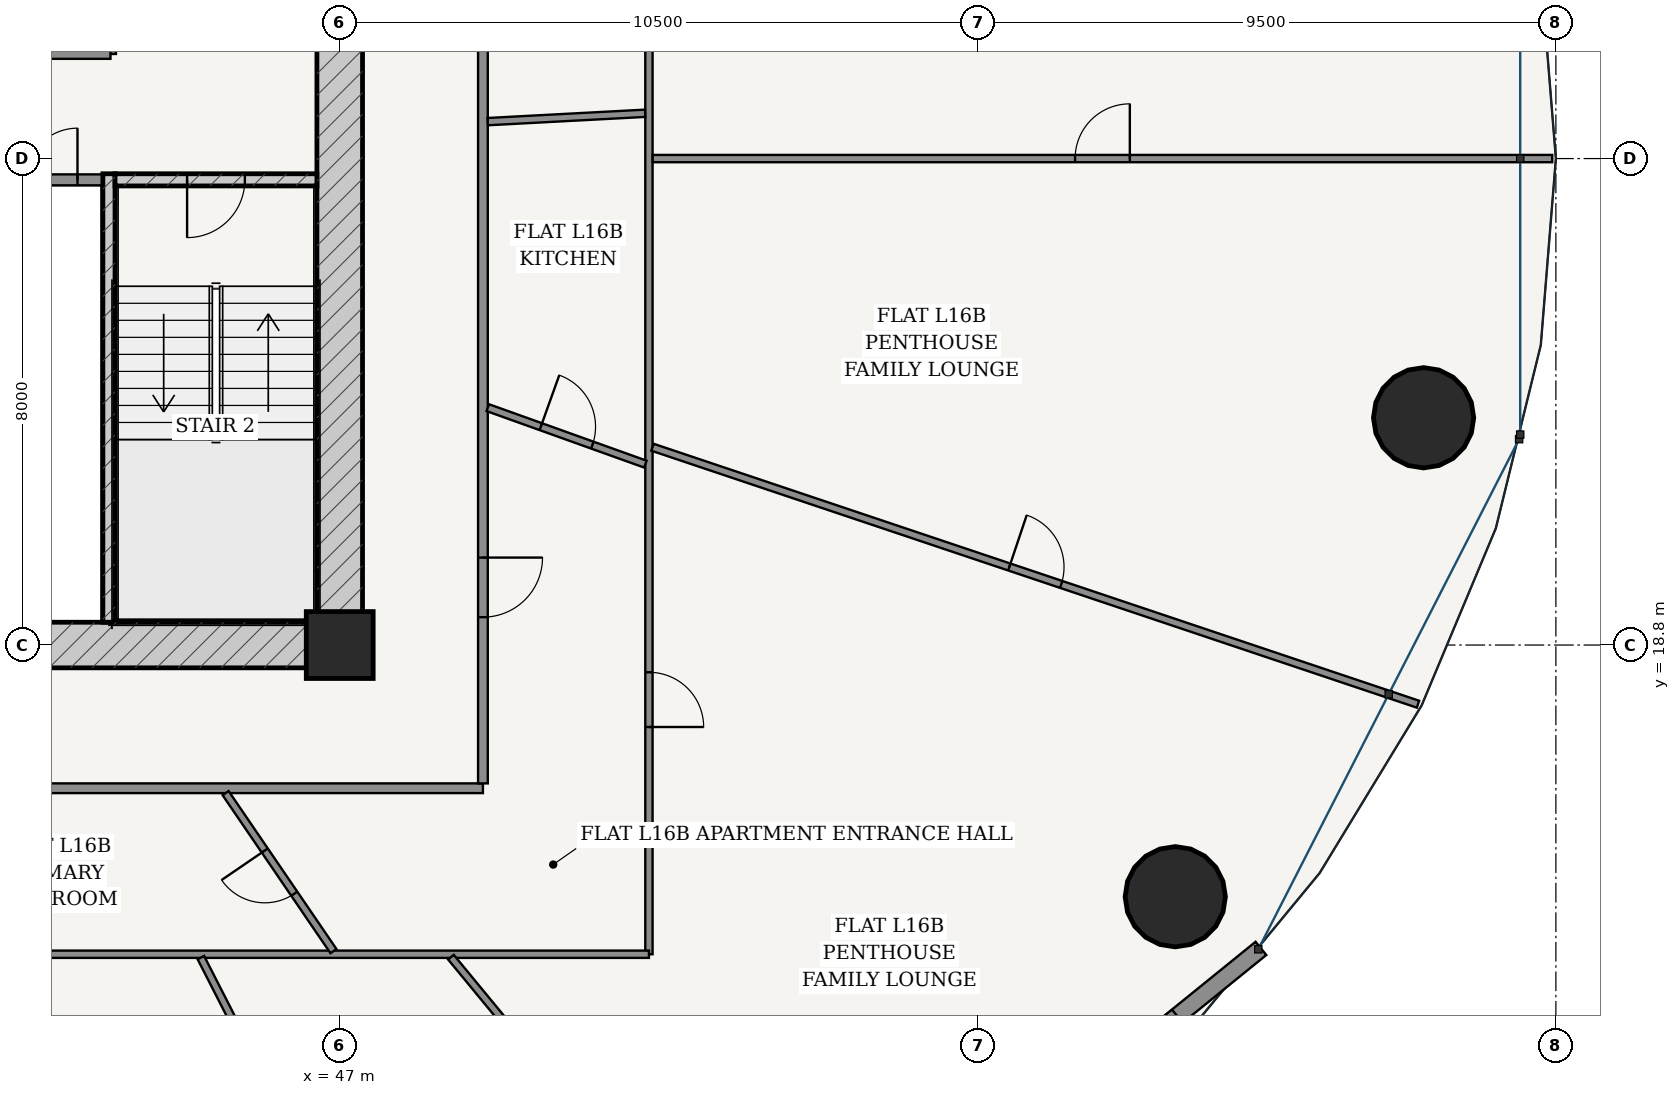
"""IFC4 building model, lengths in metres.
Left out: names, types, materials, properties, quantities, classifications, styles, units other than length and angle.
Written with IfcOpenShell. Run it as: python <this file> out.ifc"""

import sys

from ifc_helpers import new_model, si_unit, direction, frame, frame_2d, origin, origin_2d, place, context, subcontext, project, spatial, rectangle, hollow_circle, extrude, source, transform, mapped, element, fill, save


model = new_model("IFC4")
c1 = context("Model", 3, precision=1e-05, world=origin(), true_north=direction((-0.2419218956, 0.970295726276)))
c2 = subcontext(c1, "Body", "Model", "MODEL_VIEW")
j1 = project(units=[si_unit("LENGTHUNIT", "METRE"), si_unit("PLANEANGLEUNIT", "RADIAN")], contexts=[c1])
p1 = place(None, origin())
s1 = spatial("IfcSite", under=j1, at=p1, CompositionType="ELEMENT")
p2 = place(p1, origin())
s2 = spatial("IfcBuilding", under=s1, at=p2, CompositionType="ELEMENT")
p3 = place(p2, frame((0.0, 0.0, 63.6)))
s3 = spatial("IfcBuildingStorey", under=s2, at=p3, CompositionType="ELEMENT", Elevation=63.6)
p4 = place(p3, frame((47.0, 18.8, 0.0), z_axis=(0.0, 0.0, 1.0), x_axis=(1.0, 0.0, 0.0)))
e1 = element("IfcColumn", 1, at=p4, inside=s3, PredefinedType="COLUMN", context=c2, shape_type="SweptSolid", body=[
    extrude(rectangle(XDim=1.1, YDim=1.1, at=origin_2d()), origin(), (0.0, 0.0, 1.0), 3.6),
])
p5 = place(p3, frame((28.625, 18.8, 0.0), z_axis=(0.0, 0.0, 1.0), x_axis=(1.0, 0.0, 0.0)))
e2 = element("IfcWall", 2, at=p5, inside=s3, PredefinedType="SHEAR", context=c2, shape_type="SweptSolid", body=[
    extrude(rectangle(XDim=18.75, YDim=0.75, at=frame_2d((9.375, 0.0))), origin(), (0.0, 0.0, 1.0), 3.32),
])
p6 = place(p5, frame((8.95, 0.0, 0.0)))
e3 = element("IfcOpeningElement", 3, at=p6, cuts=e2, PredefinedType="OPENING", context=c2, shape_type="SweptSolid", body=[
    extrude(rectangle(XDim=0.85, YDim=2.1, at=frame_2d((0.425, 1.05))), frame((0.0, 0.385, 0.0), z_axis=(0.0, -1.0, 0.0), x_axis=(1.0, 0.0, 0.0)), (0.0, 0.0, 1.0), 0.77),
])
p7 = place(p3, frame((47.0, 19.175, 0.0), z_axis=(0.0, 0.0, 1.0), x_axis=(0.0, 1.0, 0.0)))
e4 = element("IfcWall", 4, at=p7, inside=s3, PredefinedType="SHEAR", context=c2, shape_type="SweptSolid", body=[
    extrude(rectangle(XDim=15.25, YDim=0.75, at=frame_2d((7.625, 0.0))), origin(), (0.0, 0.0, 1.0), 3.32),
])
p8 = place(p7, frame((9.875, 0.0, 0.0)))
e5 = element("IfcOpeningElement", 5, at=p8, cuts=e4, PredefinedType="OPENING", context=c2, shape_type="SweptSolid", body=[
    extrude(rectangle(XDim=1.5, YDim=2.2, at=frame_2d((0.75, 1.1))), frame((0.0, 0.385, 0.0), z_axis=(0.0, -1.0, 0.0), x_axis=(1.0, 0.0, 0.0)), (0.0, 0.0, 1.0), 0.77),
])
p9 = place(p3, frame((43.205, 19.175, 0.0), z_axis=(0.0, 0.0, 1.0), x_axis=(0.0, 1.0, 0.0)))
e6 = element("IfcWall", 6, at=p9, inside=s3, PredefinedType="SOLIDWALL", context=c2, shape_type="SweptSolid", body=[
    extrude(rectangle(XDim=7.375, YDim=0.2, at=frame_2d((3.688, 0.0))), origin(), (0.0, 0.0, 1.0), 3.32),
])
p10 = place(p3, frame((43.305, 26.45, 0.0), z_axis=(0.0, 0.0, 1.0), x_axis=(1.0, 0.0, 0.0)))
e7 = element("IfcWall", 7, at=p10, inside=s3, PredefinedType="SOLIDWALL", context=c2, shape_type="SweptSolid", body=[
    extrude(rectangle(XDim=3.32, YDim=0.2, at=frame_2d((1.66, 0.0))), origin(), (0.0, 0.0, 1.0), 3.32),
])
p11 = place(p10, frame((1.185, 0.0, 0.0)))
e8 = element("IfcOpeningElement", 8, at=p11, cuts=e7, PredefinedType="OPENING", context=c2, shape_type="SweptSolid", body=[
    extrude(rectangle(XDim=0.95, YDim=2.15, at=frame_2d((0.475, 1.075))), frame((0.0, 0.11, 0.0), z_axis=(0.0, -1.0, 0.0), x_axis=(1.0, 0.0, 0.0)), (0.0, 0.0, 1.0), 0.22),
])
for number, where, z_axis, x_axis in (
    (9, (60.741, 14.661, 0.0), (0.0, 0.0, 1.0), (1.0, 0.0, 0.0)),
    (10, (64.824, 22.537, 0.0), (0.0, 0.0, 1.0), (1.0, 0.0, 0.0)),
):
    element("IfcColumn", number, at=place(p3, frame(where, z_axis=z_axis, x_axis=x_axis)), inside=s3, PredefinedType="COLUMN", context=c2, shape_type="SweptSolid", body=[
        extrude(hollow_circle(Radius=0.825, WallThickness=0.05, at=origin_2d()), origin(), (0.0, 0.0, 1.0), 3.6),
    ])
p12 = place(p3, frame((54.033, 7.235, 0.0), z_axis=(0.0, 0.0, 1.0), x_axis=(0.777016782851, 0.629479879875, 0.0)))
e11 = element("IfcWall", 11, at=p12, inside=s3, PredefinedType="SOLIDWALL", context=c2, shape_type="SweptSolid", body=[
    extrude(rectangle(XDim=10.447, YDim=0.28, at=frame_2d((5.223, 0.0))), origin(), (0.0, 0.0, 1.0), 3.32),
])
p13 = place(p12, frame((1.771, 0.0, 0.85)))
e12 = element("IfcOpeningElement", 12, at=p13, cuts=e11, PredefinedType="OPENING", context=c2, shape_type="SweptSolid", body=[
    extrude(rectangle(XDim=2.1, YDim=1.95, at=frame_2d((1.05, 0.975))), frame((0.0, 0.15, 0.0), z_axis=(0.0, -1.0, 0.0), x_axis=(1.0, 0.0, 0.0)), (0.0, 0.0, 1.0), 0.3),
])
p14 = place(p12, frame((6.576, 0.0, 0.85)))
e13 = element("IfcOpeningElement", 13, at=p14, cuts=e11, PredefinedType="OPENING", context=c2, shape_type="SweptSolid", body=[
    extrude(rectangle(XDim=2.1, YDim=1.95, at=frame_2d((1.05, 0.975))), frame((0.0, 0.15, 0.0), z_axis=(0.0, -1.0, 0.0), x_axis=(1.0, 0.0, 0.0)), (0.0, 0.0, 1.0), 0.3),
])
p15 = place(p3, frame((41.425, 26.45, 0.0), z_axis=(0.0, 0.0, 1.0), x_axis=(1.0, 0.0, 0.0)))
e14 = element("IfcWall", 14, at=p15, inside=s3, PredefinedType="PARTITIONING", context=c2, shape_type="SweptSolid", body=[
    extrude(rectangle(XDim=1.675, YDim=0.18, at=frame_2d((0.837, 0.0))), origin(), (0.0, 0.0, 1.0), 3.32),
])
p16 = place(p15, frame((0.413, 0.0, 0.0)))
e15 = element("IfcOpeningElement", 15, at=p16, cuts=e14, PredefinedType="OPENING", context=c2, shape_type="SweptSolid", body=[
    extrude(rectangle(XDim=0.85, YDim=2.1, at=frame_2d((0.425, 1.05))), frame((0.0, 0.1, 0.0), z_axis=(0.0, -1.0, 0.0), x_axis=(1.0, 0.0, 0.0)), (0.0, 0.0, 1.0), 0.2),
])
p17 = place(p3, frame((43.23, 28.52, 0.0), z_axis=(0.0, 0.0, 1.0), x_axis=(0.0, 1.0, 0.0)))
e16 = element("IfcWall", 16, at=p17, inside=s3, PredefinedType="PARTITIONING", context=c2, shape_type="SweptSolid", body=[
    extrude(rectangle(XDim=5.905, YDim=0.18, at=frame_2d((2.953, 0.0))), origin(), (0.0, 0.0, 1.0), 3.32),
])
p18 = place(p17, frame((0.905, 0.0, 0.0)))
e17 = element("IfcOpeningElement", 17, at=p18, cuts=e16, PredefinedType="OPENING", context=c2, shape_type="SweptSolid", body=[
    extrude(rectangle(XDim=0.85, YDim=2.1, at=frame_2d((0.425, 1.05))), frame((0.0, 0.1, 0.0), z_axis=(0.0, -1.0, 0.0), x_axis=(1.0, 0.0, 0.0)), (0.0, 0.0, 1.0), 0.2),
])
p19 = place(p17, frame((3.655, 0.0, 0.0)))
e18 = element("IfcOpeningElement", 18, at=p19, cuts=e16, PredefinedType="OPENING", context=c2, shape_type="SweptSolid", body=[
    extrude(rectangle(XDim=1.15, YDim=2.2, at=frame_2d((0.575, 1.1))), frame((0.0, 0.1, 0.0), z_axis=(0.0, -1.0, 0.0), x_axis=(1.0, 0.0, 0.0)), (0.0, 0.0, 1.0), 0.2),
])
p20 = place(p3, frame((41.425, 28.52, 0.0), z_axis=(0.0, 0.0, 1.0), x_axis=(1.0, 0.0, 0.0)))
e19 = element("IfcWall", 19, at=p20, inside=s3, PredefinedType="PARTITIONING", context=c2, shape_type="SweptSolid", body=[
    extrude(rectangle(XDim=1.805, YDim=0.16, at=frame_2d((0.902, 0.0))), origin(), (0.0, 0.0, 1.0), 3.32),
])
p21 = place(p3, frame((26.645, 16.445, 0.0), z_axis=(0.0, 0.0, 1.0), x_axis=(1.0, 0.0, 0.0)))
e20 = element("IfcWall", 20, at=p21, inside=s3, PredefinedType="PARTITIONING", context=c2, shape_type="SweptSolid", body=[
    extrude(rectangle(XDim=22.71, YDim=0.16, at=frame_2d((11.355, 0.0))), origin(), (0.0, 0.0, 1.0), 2.688),
])
p22 = place(p3, frame((49.355, 16.525, 0.0), z_axis=(0.0, 0.0, 1.0), x_axis=(0.0, 1.0, 0.0)))
e21 = element("IfcWall", 21, at=p22, inside=s3, PredefinedType="PARTITIONING", context=c2, shape_type="SweptSolid", body=[
    extrude(rectangle(XDim=20.55, YDim=0.16, at=frame_2d((10.275, 0.0))), origin(), (0.0, 0.0, 1.0), 2.688),
])
p23 = place(p22, frame((2.733, 0.0, 0.0)))
e22 = element("IfcOpeningElement", 22, at=p23, cuts=e21, PredefinedType="OPENING", context=c2, shape_type="SweptSolid", body=[
    extrude(rectangle(XDim=0.98, YDim=2.2, at=frame_2d((0.49, 1.1))), frame((0.0, 0.09, 0.0), z_axis=(0.0, -1.0, 0.0), x_axis=(1.0, 0.0, 0.0)), (0.0, 0.0, 1.0), 0.18),
])
p24 = place(p3, frame((52.085, 34.324, 0.0), z_axis=(0.0, 0.0, 1.0), x_axis=(0.0, -1.0, 0.0)))
e23 = element("IfcWall", 23, at=p24, inside=s3, PredefinedType="PARTITIONING", context=c2, shape_type="SweptSolid", body=[
    extrude(rectangle(XDim=20.609, YDim=0.12, at=frame_2d((10.305, 0.0))), origin(), (0.0, 0.0, 1.0), 2.688),
])
p25 = place(p24, frame((15.972, 0.0, 0.0)))
e24 = element("IfcOpeningElement", 24, at=p25, cuts=e23, PredefinedType="OPENING", context=c2, shape_type="SweptSolid", body=[
    extrude(rectangle(XDim=0.9, YDim=2.15, at=frame_2d((0.45, 1.075))), frame((0.0, 0.07, 0.0), z_axis=(0.0, -1.0, 0.0), x_axis=(1.0, 0.0, 0.0)), (0.0, 0.0, 1.0), 0.14),
])
p26 = place(p24, frame((3.058, 0.0, 0.0)))
e25 = element("IfcOpeningElement", 25, at=p26, cuts=e23, PredefinedType="OPENING", context=c2, shape_type="SweptSolid", body=[
    extrude(rectangle(XDim=0.9, YDim=2.15, at=frame_2d((0.45, 1.075))), frame((0.0, 0.07, 0.0), z_axis=(0.0, -1.0, 0.0), x_axis=(1.0, 0.0, 0.0)), (0.0, 0.0, 1.0), 0.14),
])
p27 = place(p3, frame((52.085, 13.715, 0.0), z_axis=(0.0, 0.0, 1.0), x_axis=(-1.0, 0.0, 0.0)))
e26 = element("IfcWall", 26, at=p27, inside=s3, PredefinedType="PARTITIONING", context=c2, shape_type="SweptSolid", body=[
    extrude(rectangle(XDim=28.17, YDim=0.12, at=frame_2d((14.085, 0.0))), origin(), (0.0, 0.0, 1.0), 2.688),
])
p28 = place(p27, frame((12.891, 0.0, 0.0)))
e27 = element("IfcOpeningElement", 27, at=p28, cuts=e26, PredefinedType="OPENING", context=c2, shape_type="SweptSolid", body=[
    extrude(rectangle(XDim=0.9, YDim=2.15, at=frame_2d((0.45, 1.075))), frame((0.0, 0.07, 0.0), z_axis=(0.0, -1.0, 0.0), x_axis=(1.0, 0.0, 0.0)), (0.0, 0.0, 1.0), 0.14),
])
p29 = place(p3, frame((41.227, 13.655, 0.0), z_axis=(0.0, 0.0, 1.0), x_axis=(0.238375747469, -0.97117300365, 0.0)))
e28 = element("IfcWall", 28, at=p29, inside=s3, PredefinedType="PARTITIONING", context=c2, shape_type="SweptSolid", body=[
    extrude(rectangle(XDim=10.086, YDim=0.12, at=frame_2d((5.043, 0.0))), origin(), (0.0, 0.0, 1.0), 2.688),
])
p30 = place(p29, frame((3.519, 0.0, 0.0)))
e29 = element("IfcOpeningElement", 29, at=p30, cuts=e28, PredefinedType="OPENING", context=c2, shape_type="SweptSolid", body=[
    extrude(rectangle(XDim=0.9, YDim=2.15, at=frame_2d((0.45, 1.075))), frame((0.0, 0.07, 0.0), z_axis=(0.0, -1.0, 0.0), x_axis=(1.0, 0.0, 0.0)), (0.0, 0.0, 1.0), 0.14),
])
p31 = place(p3, frame((44.717, 13.66, 0.0), z_axis=(0.0, 0.0, 1.0), x_axis=(0.455131303234, -0.890424335256, 0.0)))
e30 = element("IfcWall", 30, at=p31, inside=s3, PredefinedType="PARTITIONING", context=c2, shape_type="SweptSolid", body=[
    extrude(rectangle(XDim=9.562, YDim=0.12, at=frame_2d((4.781, 0.0))), origin(), (0.0, 0.0, 1.0), 2.762),
])
p32 = place(p31, frame((4.331, 0.0, 0.0)))
e31 = element("IfcOpeningElement", 31, at=p32, cuts=e30, PredefinedType="OPENING", context=c2, shape_type="SweptSolid", body=[
    extrude(rectangle(XDim=0.9, YDim=2.15, at=frame_2d((0.45, 1.075))), frame((0.0, 0.07, 0.0), z_axis=(0.0, -1.0, 0.0), x_axis=(1.0, 0.0, 0.0)), (0.0, 0.0, 1.0), 0.14),
])
p33 = place(p3, frame((48.829, 13.667, 0.0), z_axis=(0.0, 0.0, 1.0), x_axis=(0.636177533893, -0.771542704826, 0.0)))
e32 = element("IfcWall", 32, at=p33, inside=s3, PredefinedType="PARTITIONING", context=c2, shape_type="SweptSolid", body=[
    extrude(rectangle(XDim=8.187, YDim=0.12, at=frame_2d((4.093, 0.0))), origin(), (0.0, 0.0, 1.0), 2.688),
])
p34 = place(p33, frame((2.584, 0.0, 0.0)))
e33 = element("IfcOpeningElement", 33, at=p34, cuts=e32, PredefinedType="OPENING", context=c2, shape_type="SweptSolid", body=[
    extrude(rectangle(XDim=0.9, YDim=2.15, at=frame_2d((0.45, 1.075))), frame((0.0, 0.07, 0.0), z_axis=(0.0, -1.0, 0.0), x_axis=(1.0, 0.0, 0.0)), (0.0, 0.0, 1.0), 0.14),
])
p35 = place(p3, frame((52.144, 22.052, 0.0), z_axis=(0.0, 0.0, 1.0), x_axis=(0.948023034133, -0.318201707653, 0.0)))
e34 = element("IfcWall", 34, at=p35, inside=s3, PredefinedType="PARTITIONING", context=c2, shape_type="SweptSolid", body=[
    extrude(rectangle(XDim=13.279, YDim=0.12, at=frame_2d((6.639, 0.0))), origin(), (0.0, 0.0, 1.0), 2.762),
])
p36 = place(p35, frame((6.189, 0.0, 0.0)))
e35 = element("IfcOpeningElement", 35, at=p36, cuts=e34, PredefinedType="OPENING", context=c2, shape_type="SweptSolid", body=[
    extrude(rectangle(XDim=0.9, YDim=2.15, at=frame_2d((0.45, 1.075))), frame((0.0, 0.07, 0.0), z_axis=(0.0, -1.0, 0.0), x_axis=(1.0, 0.0, 0.0)), (0.0, 0.0, 1.0), 0.14),
])
p37 = place(p3, frame((52.147, 26.8, 0.0), z_axis=(0.0, 0.0, 1.0), x_axis=(1.0, 0.0, 0.0)))
e36 = element("IfcWall", 36, at=p37, inside=s3, PredefinedType="PARTITIONING", context=c2, shape_type="SweptSolid", body=[
    extrude(rectangle(XDim=14.793, YDim=0.12, at=frame_2d((7.396, 0.0))), origin(), (0.0, 0.0, 1.0), 2.762),
])
p38 = place(p37, frame((6.947, 0.0, 0.0)))
e37 = element("IfcOpeningElement", 37, at=p38, cuts=e36, PredefinedType="OPENING", context=c2, shape_type="SweptSolid", body=[
    extrude(rectangle(XDim=0.9, YDim=2.15, at=frame_2d((0.45, 1.075))), frame((0.0, 0.07, 0.0), z_axis=(0.0, -1.0, 0.0), x_axis=(1.0, 0.0, 0.0)), (0.0, 0.0, 1.0), 0.14),
])
p39 = place(p3, frame((45.123, 16.365, 0.0), z_axis=(0.0, 0.0, 1.0), x_axis=(0.563762888243, -0.825936683917, 0.0)))
e38 = element("IfcWall", 38, at=p39, inside=s3, PredefinedType="PARTITIONING", context=c2, shape_type="SweptSolid", body=[
    extrude(rectangle(XDim=3.146, YDim=0.12, at=frame_2d((1.573, 0.0))), origin(), (0.0, 0.0, 1.0), 3.32),
])
p40 = place(p39, frame((1.143, 0.0, 0.0)))
e39 = element("IfcOpeningElement", 39, at=p40, cuts=e38, PredefinedType="OPENING", context=c2, shape_type="SweptSolid", body=[
    extrude(rectangle(XDim=0.86, YDim=2.15, at=frame_2d((0.43, 1.075))), frame((0.0, 0.07, 0.0), z_axis=(0.0, -1.0, 0.0), x_axis=(1.0, 0.0, 0.0)), (0.0, 0.0, 1.0), 0.14),
])
p41 = place(p3, frame((49.435, 22.703, 0.0), z_axis=(0.0, 0.0, 1.0), x_axis=(0.941406362049, -0.337274460186, 0.0)))
e40 = element("IfcWall", 40, at=p41, inside=s3, PredefinedType="PARTITIONING", context=c2, shape_type="SweptSolid", body=[
    extrude(rectangle(XDim=2.753, YDim=0.12, at=frame_2d((1.376, 0.0))), origin(), (0.0, 0.0, 1.0), 3.32),
])
p42 = place(p41, frame((0.927, 0.0, 0.0)))
e41 = element("IfcOpeningElement", 41, at=p42, cuts=e40, PredefinedType="OPENING", context=c2, shape_type="SweptSolid", body=[
    extrude(rectangle(XDim=0.9, YDim=2.15, at=frame_2d((0.45, 1.075))), frame((0.0, 0.07, 0.0), z_axis=(0.0, -1.0, 0.0), x_axis=(1.0, 0.0, 0.0)), (0.0, 0.0, 1.0), 0.14),
])
p43 = place(p3, frame((49.435, 27.407, 0.0), z_axis=(0.0, 0.0, 1.0), x_axis=(0.998587742853, 0.053127392413, 0.0)))
e42 = element("IfcWall", 42, at=p43, inside=s3, PredefinedType="PARTITIONING", context=c2, shape_type="SweptSolid", body=[
    extrude(rectangle(XDim=2.592, YDim=0.12, at=frame_2d((1.296, 0.0))), origin(), (0.0, 0.0, 1.0), 3.32),
])
m1 = source(origin(), c2, "Body", "SweptSolid", [
    extrude(rectangle(XDim=2.1, YDim=1.95, at=frame_2d((1.05, 0.975))), frame((0.0, 0.03, 0.0), z_axis=(0.0, -1.0, 0.0), x_axis=(1.0, 0.0, 0.0)), (0.0, 0.0, 1.0), 0.06),
])
p44 = place(p14, origin())
e43 = element("IfcWindow", 43, at=p44, inside=s3, PartitioningType="SINGLE_PANEL", PredefinedType="WINDOW", context=c2, shape_type="MappedRepresentation", body=[
    mapped(m1, transform((0.0, 0.0, 0.0), scale=1.0)),
])
fill(e13, e43)
m2 = source(origin(), c2, "Body", "SweptSolid", [
    extrude(rectangle(XDim=0.95, YDim=2.15, at=frame_2d((0.475, 1.075))), frame((0.0, 0.025, 0.0), z_axis=(0.0, -1.0, 0.0), x_axis=(1.0, 0.0, 0.0)), (0.0, 0.0, 1.0), 0.05),
])
p45 = place(p11, frame((0.95, 0.0, 0.0), z_axis=(0.0, 0.0, 1.0), x_axis=(-1.0, 0.0, 0.0)))
e44 = element("IfcDoor", 44, at=p45, inside=s3, OperationType="SINGLE_SWING_RIGHT", PredefinedType="DOOR", context=c2, shape_type="MappedRepresentation", body=[
    mapped(m2, transform((0.0, 0.0, 0.0), scale=1.0)),
])
fill(e8, e44)
m3 = source(origin(), c2, "Body", "SweptSolid", [
    extrude(rectangle(XDim=0.85, YDim=2.1, at=frame_2d((0.425, 1.05))), frame((0.0, 0.025, 0.0), z_axis=(0.0, -1.0, 0.0), x_axis=(1.0, 0.0, 0.0)), (0.0, 0.0, 1.0), 0.05),
])
p46 = place(p16, origin())
e45 = element("IfcDoor", 45, at=p46, inside=s3, OperationType="SINGLE_SWING_RIGHT", PredefinedType="DOOR", context=c2, shape_type="MappedRepresentation", body=[
    mapped(m3, transform((0.0, 0.0, 0.0), scale=1.0)),
])
fill(e15, e45)
m4 = source(origin(), c2, "Body", "SweptSolid", [
    extrude(rectangle(XDim=0.98, YDim=2.2, at=frame_2d((0.49, 1.1))), frame((0.0, 0.025, 0.0), z_axis=(0.0, -1.0, 0.0), x_axis=(1.0, 0.0, 0.0)), (0.0, 0.0, 1.0), 0.05),
])
p47 = place(p23, frame((0.98, 0.0, 0.0), z_axis=(0.0, 0.0, 1.0), x_axis=(-1.0, 0.0, 0.0)))
e46 = element("IfcDoor", 46, at=p47, inside=s3, OperationType="SINGLE_SWING_LEFT", PredefinedType="DOOR", context=c2, shape_type="MappedRepresentation", body=[
    mapped(m4, transform((0.0, 0.0, 0.0), scale=1.0)),
])
fill(e22, e46)
m5 = source(origin(), c2, "Body", "SweptSolid", [
    extrude(rectangle(XDim=0.86, YDim=2.15, at=frame_2d((0.43, 1.075))), frame((0.0, 0.025, 0.0), z_axis=(0.0, -1.0, 0.0), x_axis=(1.0, 0.0, 0.0)), (0.0, 0.0, 1.0), 0.05),
])
p48 = place(p40, frame((0.86, 0.0, 0.0), z_axis=(0.0, 0.0, 1.0), x_axis=(-1.0, 0.0, 0.0)))
e47 = element("IfcDoor", 47, at=p48, inside=s3, OperationType="SINGLE_SWING_RIGHT", PredefinedType="DOOR", context=c2, shape_type="MappedRepresentation", body=[
    mapped(m5, transform((0.0, 0.0, 0.0), scale=1.0)),
])
fill(e39, e47)
m6 = source(origin(), c2, "Body", "SweptSolid", [
    extrude(rectangle(XDim=0.9, YDim=2.15, at=frame_2d((0.45, 1.075))), frame((0.0, 0.025, 0.0), z_axis=(0.0, -1.0, 0.0), x_axis=(1.0, 0.0, 0.0)), (0.0, 0.0, 1.0), 0.05),
])
p49 = place(p42, origin())
e48 = element("IfcDoor", 48, at=p49, inside=s3, OperationType="SINGLE_SWING_LEFT", PredefinedType="DOOR", context=c2, shape_type="MappedRepresentation", body=[
    mapped(m6, transform((0.0, 0.0, 0.0), scale=1.0)),
])
fill(e41, e48)
p50 = place(p25, origin())
e49 = element("IfcDoor", 49, at=p50, inside=s3, OperationType="SINGLE_SWING_RIGHT", PredefinedType="DOOR", context=c2, shape_type="MappedRepresentation", body=[
    mapped(m6, transform((0.0, 0.0, 0.0), scale=1.0)),
])
fill(e24, e49)
p51 = place(p36, origin())
e50 = element("IfcDoor", 50, at=p51, inside=s3, OperationType="SINGLE_SWING_LEFT", PredefinedType="DOOR", context=c2, shape_type="MappedRepresentation", body=[
    mapped(m6, transform((0.0, 0.0, 0.0), scale=1.0)),
])
fill(e35, e50)
p52 = place(p38, origin())
e51 = element("IfcDoor", 51, at=p52, inside=s3, OperationType="SINGLE_SWING_RIGHT", PredefinedType="DOOR", context=c2, shape_type="MappedRepresentation", body=[
    mapped(m6, transform((0.0, 0.0, 0.0), scale=1.0)),
])
fill(e37, e51)
save(model, sys.argv[1])
